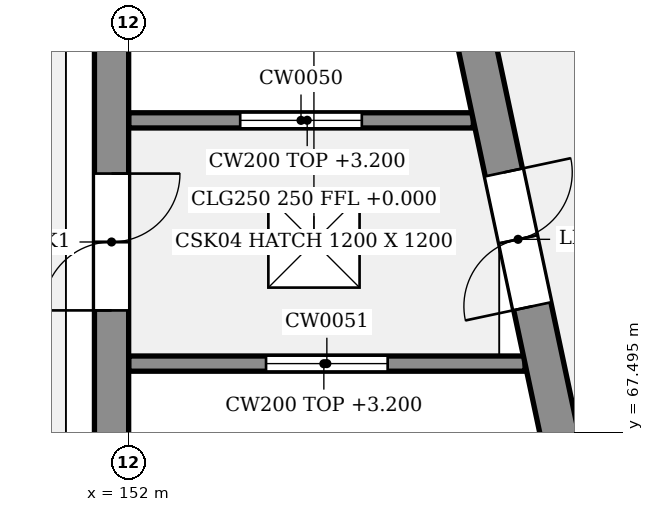
"""IFC4 building model, lengths in metres.
Left out: names, types, materials, properties, quantities, classifications, styles, units other than length and angle.
Written with IfcOpenShell. Run it as: python <this file> out.ifc"""

import sys

from ifc_helpers import new_model, si_unit, direction, frame, frame_2d, origin, origin_2d, place, context, subcontext, project, spatial, rectangle, extrude, element, fill, save


model = new_model("IFC4")
c1 = context("Model", 3, precision=1e-05, world=origin(), true_north=direction((0.0, 1.0)))
c2 = subcontext(c1, "Body", "Model", "MODEL_VIEW")
j1 = project(units=[si_unit("LENGTHUNIT", "METRE"), si_unit("PLANEANGLEUNIT", "RADIAN")], contexts=[c1])
p1 = place(None, origin())
s1 = spatial("IfcSite", under=j1, at=p1, CompositionType="ELEMENT")
p2 = place(p1, origin())
s2 = spatial("IfcBuilding", under=s1, at=p2, CompositionType="ELEMENT")
p3 = place(p2, origin())
s3 = spatial("IfcBuildingStorey", under=s2, at=p3, CompositionType="ELEMENT", Elevation=0.0)
p4 = place(p3, frame((151.775, 38.0, 0.0), z_axis=(0.0, 0.0, 1.0), x_axis=(0.0, 1.0, 0.0)))
e1 = element("IfcWall", 1, at=p4, inside=s3, PredefinedType="ELEMENTEDWALL", context=c2, shape_type="SweptSolid", body=[
    extrude(rectangle(XDim=46.0, YDim=0.45, at=frame_2d((23.0, 0.0))), origin(), (0.0, 0.0, 1.0), 5.0),
])
p5 = place(p4, frame((10.9, 0.0, 0.0), z_axis=(0.0, 0.0, 1.0), x_axis=(-1.0, 0.0, 0.0)))
e2 = element("IfcOpeningElement", 2, at=p5, cuts=e1, PredefinedType="OPENING", context=c2, shape_type="SweptSolid", body=[
    extrude(rectangle(XDim=1.8, YDim=2.4, at=frame_2d((0.9, 1.2))), frame((0.0, 0.235, 0.0), z_axis=(0.0, -1.0, 0.0), x_axis=(1.0, 0.0, 0.0)), (0.0, 0.0, 1.0), 0.47),
])
p6 = place(p4, frame((36.9, 0.0, 0.0), z_axis=(0.0, 0.0, 1.0), x_axis=(-1.0, 0.0, 0.0)))
e3 = element("IfcOpeningElement", 3, at=p6, cuts=e1, PredefinedType="OPENING", context=c2, shape_type="SweptSolid", body=[
    extrude(rectangle(XDim=1.8, YDim=2.4, at=frame_2d((0.9, 1.2))), frame((0.0, 0.235, 0.0), z_axis=(0.0, -1.0, 0.0), x_axis=(1.0, 0.0, 0.0)), (0.0, 0.0, 1.0), 0.47),
])
p7 = place(p4, frame((31.1, 0.0, 0.0)))
e4 = element("IfcOpeningElement", 4, at=p7, cuts=e1, PredefinedType="OPENING", context=c2, shape_type="SweptSolid", body=[
    extrude(rectangle(XDim=1.8, YDim=2.4, at=frame_2d((0.9, 1.2))), frame((0.0, 0.235, 0.0), z_axis=(0.0, -1.0, 0.0), x_axis=(1.0, 0.0, 0.0)), (0.0, 0.0, 1.0), 0.47),
])
p8 = place(p3, frame((163.194, 41.473, 0.0), z_axis=(0.0, 0.0, 1.0), x_axis=(-0.20790710573, 0.978148575313, 0.0)))
e5 = element("IfcWall", 5, at=p8, inside=s3, PredefinedType="SOLIDWALL", context=c2, shape_type="SweptSolid", body=[
    extrude(rectangle(XDim=34.0, YDim=0.5, at=frame_2d((17.0, 0.0))), origin(), (0.0, 0.0, 1.0), 5.0),
])
p9 = place(p8, frame((28.3, 0.0, 0.0)))
e6 = element("IfcOpeningElement", 6, at=p9, cuts=e5, PredefinedType="OPENING", context=c2, shape_type="SweptSolid", body=[
    extrude(rectangle(XDim=1.8, YDim=2.4, at=frame_2d((0.9, 1.2))), frame((0.0, 0.26, 0.0), z_axis=(0.0, -1.0, 0.0), x_axis=(1.0, 0.0, 0.0)), (0.0, 0.0, 1.0), 0.52),
])
p10 = place(p3, frame((152.0, 71.6, 0.0), z_axis=(0.0, 0.0, 1.0), x_axis=(1.0, 0.0, 0.0)))
e7 = element("IfcWall", 7, at=p10, inside=s3, PredefinedType="ELEMENTEDWALL", context=c2, shape_type="SweptSolid", body=[
    extrude(rectangle(XDim=4.535, YDim=0.2, at=frame_2d((2.268, 0.0))), origin(), (0.0, 0.0, 1.0), 3.2),
])
p11 = place(p10, frame((1.468, 0.0, 0.9)))
e8 = element("IfcOpeningElement", 8, at=p11, cuts=e7, PredefinedType="OPENING", context=c2, shape_type="SweptSolid", body=[
    extrude(rectangle(XDim=1.6, YDim=1.6, at=frame_2d((0.8, 0.8))), frame((0.0, 0.11, 0.0), z_axis=(0.0, -1.0, 0.0), x_axis=(1.0, 0.0, 0.0)), (0.0, 0.0, 1.0), 0.22),
])
p12 = place(p3, frame((152.0, 68.4, 0.0), z_axis=(0.0, 0.0, 1.0), x_axis=(1.0, 0.0, 0.0)))
e9 = element("IfcWall", 9, at=p12, inside=s3, PredefinedType="ELEMENTEDWALL", context=c2, shape_type="SweptSolid", body=[
    extrude(rectangle(XDim=5.215, YDim=0.2, at=frame_2d((2.607, 0.0))), origin(), (0.0, 0.0, 1.0), 3.2),
])
p13 = place(p12, frame((1.808, 0.0, 0.9)))
e10 = element("IfcOpeningElement", 10, at=p13, cuts=e9, PredefinedType="OPENING", context=c2, shape_type="SweptSolid", body=[
    extrude(rectangle(XDim=1.6, YDim=1.6, at=frame_2d((0.8, 0.8))), frame((0.0, 0.11, 0.0), z_axis=(0.0, -1.0, 0.0), x_axis=(1.0, 0.0, 0.0)), (0.0, 0.0, 1.0), 0.22),
])
p14 = place(p3, frame((0.0, 0.0, 3.2)))
p15 = place(p14, frame((154.438, 70.0, 0.0)))
p16 = place(p15, frame((0.0, 0.0, 0.15)))
e11 = element("IfcWindow", 11, at=p16, inside=s3, PartitioningType="SINGLE_PANEL", PredefinedType="SKYLIGHT", context=c2, shape_type="SweptSolid", body=[
    extrude(rectangle(XDim=1.2, YDim=1.2, at=origin_2d()), origin(), (0.0, 0.0, 1.0), 0.05),
])
p17 = place(p11, origin())
e12 = element("IfcWindow", 12, at=p17, inside=s3, PartitioningType="SINGLE_PANEL", PredefinedType="WINDOW", context=c2, shape_type="SweptSolid", body=[
    extrude(rectangle(XDim=1.6, YDim=1.6, at=frame_2d((0.8, 0.8))), frame((0.0, 0.03, 0.0), z_axis=(0.0, -1.0, 0.0), x_axis=(1.0, 0.0, 0.0)), (0.0, 0.0, 1.0), 0.06),
])
fill(e8, e12)
p18 = place(p13, origin())
e13 = element("IfcWindow", 13, at=p18, inside=s3, PartitioningType="SINGLE_PANEL", PredefinedType="WINDOW", context=c2, shape_type="SweptSolid", body=[
    extrude(rectangle(XDim=1.6, YDim=1.6, at=frame_2d((0.8, 0.8))), frame((0.0, 0.03, 0.0), z_axis=(0.0, -1.0, 0.0), x_axis=(1.0, 0.0, 0.0)), (0.0, 0.0, 1.0), 0.06),
])
fill(e10, e13)
p19 = place(p7, origin())
e14 = element("IfcDoor", 14, at=p19, inside=s3, OperationType="DOUBLE_DOOR_SINGLE_SWING", PredefinedType="DOOR", context=c2, shape_type="SweptSolid", body=[
    extrude(rectangle(XDim=1.8, YDim=2.4, at=frame_2d((0.9, 1.2))), frame((0.0, 0.025, 0.0), z_axis=(0.0, -1.0, 0.0), x_axis=(1.0, 0.0, 0.0)), (0.0, 0.0, 1.0), 0.05),
])
fill(e4, e14)
p20 = place(p9, origin())
e15 = element("IfcDoor", 15, at=p20, inside=s3, OperationType="DOUBLE_DOOR_SINGLE_SWING", PredefinedType="DOOR", context=c2, shape_type="SweptSolid", body=[
    extrude(rectangle(XDim=1.8, YDim=2.4, at=frame_2d((0.9, 1.2))), frame((0.0, 0.025, 0.0), z_axis=(0.0, -1.0, 0.0), x_axis=(1.0, 0.0, 0.0)), (0.0, 0.0, 1.0), 0.05),
])
fill(e6, e15)
save(model, sys.argv[1])
